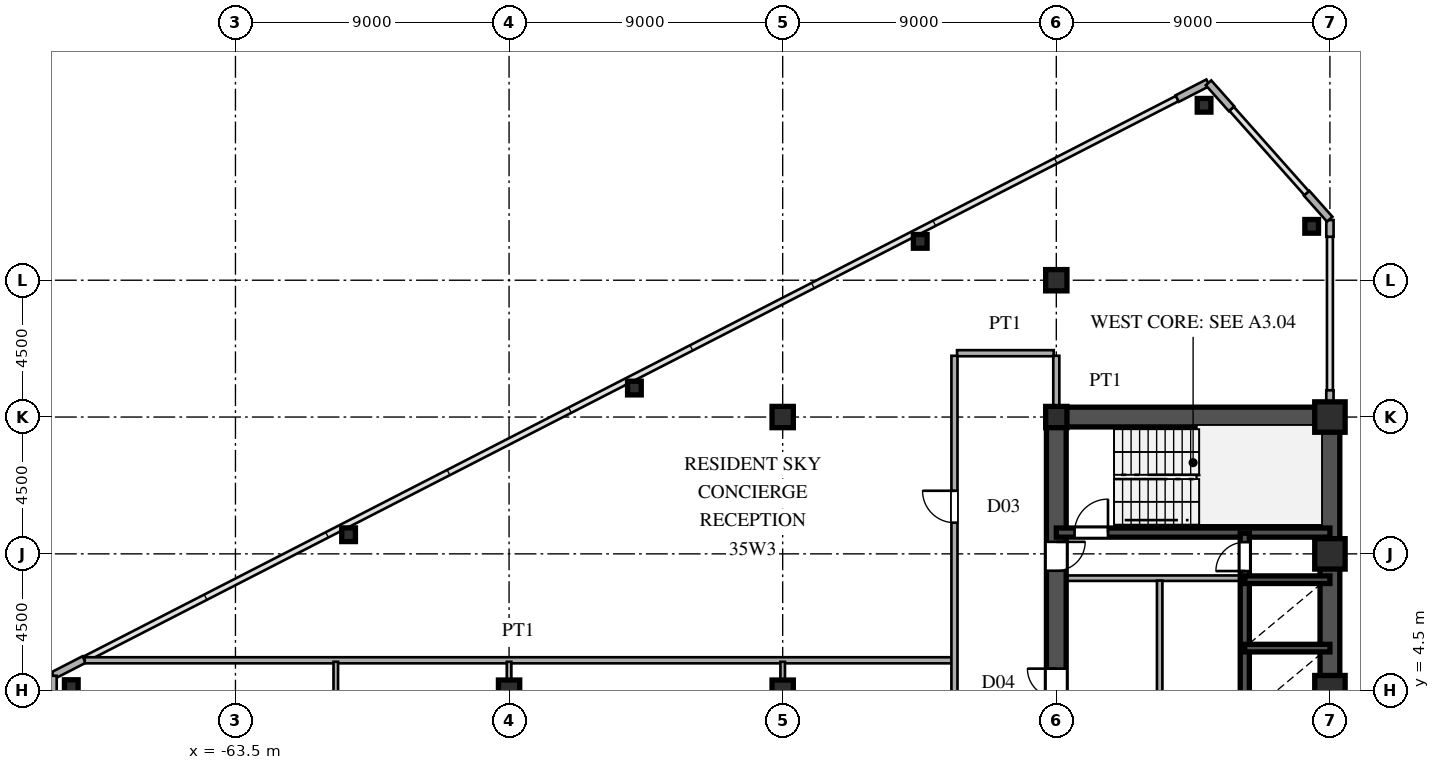
"""IFC4 building model, lengths in metres.
Left out: names, types, materials, properties, quantities, classifications, styles, units other than length and angle.
Written with IfcOpenShell. Run it as: python <this file> out.ifc"""

import sys

from ifc_helpers import new_model, si_unit, direction, frame, frame_2d, origin, origin_2d, place, context, subcontext, project, spatial, rectangle, hollow_rectangle, i_section, extrude, source, transform, mapped, element, fill, save


model = new_model("IFC4")
c1 = context("Model", 3, precision=1e-05, world=origin(), true_north=direction((0.0, 1.0)))
c2 = subcontext(c1, "Body", "Model", "MODEL_VIEW")
j1 = project(units=[si_unit("LENGTHUNIT", "METRE"), si_unit("PLANEANGLEUNIT", "RADIAN")], contexts=[c1])
p1 = place(None, origin())
s1 = spatial("IfcSite", under=j1, at=p1, CompositionType="ELEMENT")
p2 = place(p1, origin())
s2 = spatial("IfcBuilding", under=s1, at=p2, CompositionType="ELEMENT")
p3 = place(p2, frame((0.0, 0.0, 132.0)))
s3 = spatial("IfcBuildingStorey", under=s2, at=p3, CompositionType="ELEMENT", Elevation=132.0)
m1 = source(origin(), c2, "Body", "SweptSolid", [
    extrude(hollow_rectangle(XDim=1.0, YDim=1.0, WallThickness=0.042, at=origin_2d()), origin(), (0.0, 0.0, 1.0), 3.6),
])
for number, where, z_axis, x_axis in (
    (1, (-27.5, 4.5, 0.0), (0.0, 0.0, 1.0), (1.0, 0.0, 0.0)),
    (2, (-27.5, 9.0, 0.0), (0.0, 0.0, 1.0), (1.0, 0.0, 0.0)),
    (3, (-27.5, 13.5, 0.0), (0.0, 0.0, 1.0), (1.0, 0.0, 0.0)),
):
    element("IfcColumn", number, at=place(p3, frame(where, z_axis=z_axis, x_axis=x_axis)), inside=s3, PredefinedType="COLUMN", context=c2, shape_type="MappedRepresentation", body=[
        mapped(m1, transform((0.0, 0.0, 0.0), scale=1.0)),
    ])
m2 = source(origin(), c2, "Body", "SweptSolid", [
    extrude(i_section(OverallWidth=0.7, OverallDepth=0.7, WebThickness=0.028, FlangeThickness=0.045, at=origin_2d()), origin(), (0.0, 0.0, 1.0), 3.6),
])
for number, where, z_axis, x_axis in (
    (4, (-36.5, 13.5, 0.0), (0.0, 0.0, 1.0), (1.0, 0.0, 0.0)),
    (5, (-36.5, 18.0, 0.0), (0.0, 0.0, 1.0), (1.0, 0.0, 0.0)),
    (6, (-45.5, 4.5, 0.0), (0.0, 0.0, 1.0), (1.0, 0.0, 0.0)),
    (7, (-45.5, 13.5, 0.0), (0.0, 0.0, 1.0), (1.0, 0.0, 0.0)),
    (8, (-54.5, 4.5, 0.0), (0.0, 0.0, 1.0), (1.0, 0.0, 0.0)),
):
    element("IfcColumn", number, at=place(p3, frame(where, z_axis=z_axis, x_axis=x_axis)), inside=s3, PredefinedType="COLUMN", context=c2, shape_type="MappedRepresentation", body=[
        mapped(m2, transform((0.0, 0.0, 0.0), scale=1.0)),
    ])
m3 = source(origin(), c2, "Body", "SweptSolid", [
    extrude(hollow_rectangle(XDim=0.45, YDim=0.45, WallThickness=0.018, at=origin_2d()), origin(), (0.0, 0.0, 1.0), 3.6),
])
for number, where, z_axis, x_axis in (
    (9, (-28.1, 19.772, 0.0), (0.0, 0.0, 1.0), (1.0, 0.0, 0.0)),
    (10, (-31.64, 23.754, 0.0), (0.0, 0.0, 1.0), (1.0, 0.0, 0.0)),
    (11, (-68.9, 4.634, 0.0), (0.0, 0.0, 1.0), (1.0, 0.0, 0.0)),
    (12, (-40.976, 19.278, 0.0), (0.0, 0.0, 1.0), (1.0, 0.0, 0.0)),
    (13, (-50.377, 14.453, 0.0), (0.0, 0.0, 1.0), (1.0, 0.0, 0.0)),
    (14, (-59.779, 9.629, 0.0), (0.0, 0.0, 1.0), (1.0, 0.0, 0.0)),
):
    element("IfcColumn", number, at=place(p3, frame(where, z_axis=z_axis, x_axis=x_axis)), inside=s3, PredefinedType="COLUMN", context=c2, shape_type="MappedRepresentation", body=[
        mapped(m3, transform((0.0, 0.0, 0.0), scale=1.0)),
    ])
p4 = place(p3, frame((-27.5, 13.83, 0.0), z_axis=(0.0, 0.0, 1.0), x_axis=(0.0, 1.0, 0.0)))
e15 = element("IfcWall", 15, at=p4, inside=s3, PredefinedType="SOLIDWALL", context=c2, shape_type="SweptSolid", body=[
    extrude(rectangle(XDim=0.55, YDim=0.24, at=frame_2d((0.275, 0.0))), origin(), (0.0, 0.0, 1.0), 2.79),
])
p5 = place(p3, frame((-27.5, 19.43, 0.0), z_axis=(0.0, 0.0, 1.0), x_axis=(0.0, 1.0, 0.0)))
e16 = element("IfcWall", 16, at=p5, inside=s3, PredefinedType="SOLIDWALL", context=c2, shape_type="SweptSolid", body=[
    extrude(rectangle(XDim=0.55, YDim=0.24, at=frame_2d((0.275, 0.0))), origin(), (0.0, 0.0, 1.0), 3.34),
])
for number, where, z_axis, x_axis in (
    (17, (-27.507, 20.008, 0.0), (0.0, 0.0, 1.0), (-0.664, 0.747, 0.0)),
    (18, (-30.736, 23.64, 0.0), (0.0, 0.0, 1.0), (-0.664, 0.747, 0.0)),
):
    element("IfcWall", number, at=place(p3, frame(where, z_axis=z_axis, x_axis=x_axis)), inside=s3, PredefinedType="SOLIDWALL", context=c2, shape_type="SweptSolid", body=[
        extrude(rectangle(XDim=1.14, YDim=0.24, at=frame_2d((0.57, 0.0))), origin(), (0.0, 0.0, 1.0), 3.34),
    ])
for number, where, z_axis, x_axis in (
    (19, (-31.509, 24.495, 0.0), (0.0, 0.0, 1.0), (-0.89, -0.456, 0.0)),
    (20, (-68.477, 5.525, 0.0), (0.0, 0.0, 1.0), (-0.89, -0.456, 0.0)),
):
    element("IfcWall", number, at=place(p3, frame(where, z_axis=z_axis, x_axis=x_axis)), inside=s3, PredefinedType="SOLIDWALL", context=c2, shape_type="SweptSolid", body=[
        extrude(rectangle(XDim=1.14, YDim=0.24, at=frame_2d((0.57, 0.0))), origin(), (0.0, 0.0, 1.0), 3.34),
    ])
p6 = place(p3, frame((-69.5, 4.99, 0.0), z_axis=(0.0, 0.0, 1.0), x_axis=(0.0, -1.0, 0.0)))
e21 = element("IfcWall", 21, at=p6, inside=s3, PredefinedType="SOLIDWALL", context=c2, shape_type="SweptSolid", body=[
    extrude(rectangle(XDim=1.14, YDim=0.24, at=frame_2d((0.57, 0.0))), origin(), (0.0, 0.0, 1.0), 3.34),
])
p7 = place(p3, frame((-27.5, 1.3, 0.0), z_axis=(0.0, 0.0, 1.0), x_axis=(0.0, 1.0, 0.0)))
e22 = element("IfcWall", 22, at=p7, inside=s3, PredefinedType="SHEAR", context=c2, shape_type="SweptSolid", body=[
    extrude(rectangle(XDim=12.2, YDim=0.65, at=frame_2d((6.1, 0.0))), origin(), (0.0, 0.0, 1.0), 3.34),
])
p8 = place(p3, frame((-36.5, 13.5, 0.0), z_axis=(0.0, 0.0, 1.0), x_axis=(1.0, 0.0, 0.0)))
e23 = element("IfcWall", 23, at=p8, inside=s3, PredefinedType="SHEAR", context=c2, shape_type="SweptSolid", body=[
    extrude(rectangle(XDim=9.0, YDim=0.65, at=frame_2d((4.5, 0.0))), origin(), (0.0, 0.0, 1.0), 3.34),
])
p9 = place(p3, frame((-36.5, 8.2, 0.0), z_axis=(0.0, 0.0, 1.0), x_axis=(0.0, 1.0, 0.0)))
e24 = element("IfcWall", 24, at=p9, inside=s3, PredefinedType="SHEAR", context=c2, shape_type="SweptSolid", body=[
    extrude(rectangle(XDim=5.45, YDim=0.65, at=frame_2d((2.725, 0.0))), origin(), (0.0, 0.0, 1.0), 3.34),
])
p10 = place(p9, frame((0.245, 0.0, 0.0)))
e25 = element("IfcOpeningElement", 25, at=p10, cuts=e24, PredefinedType="OPENING", context=c2, shape_type="SweptSolid", body=[
    extrude(rectangle(XDim=0.95, YDim=2.15, at=frame_2d((0.475, 1.075))), frame((0.0, 0.335, 0.0), z_axis=(0.0, -1.0, 0.0), x_axis=(1.0, 0.0, 0.0)), (0.0, 0.0, 1.0), 0.67),
])
p11 = place(p3, frame((-36.5, 1.3, 0.0), z_axis=(0.0, 0.0, 1.0), x_axis=(0.0, 1.0, 0.0)))
e26 = element("IfcWall", 26, at=p11, inside=s3, PredefinedType="SHEAR", context=c2, shape_type="SweptSolid", body=[
    extrude(rectangle(XDim=6.9, YDim=0.65, at=frame_2d((3.45, 0.0))), origin(), (0.0, 0.0, 1.0), 3.34),
])
p12 = place(p11, frame((2.975, 0.0, 0.0)))
e27 = element("IfcOpeningElement", 27, at=p12, cuts=e26, PredefinedType="OPENING", context=c2, shape_type="SweptSolid", body=[
    extrude(rectangle(XDim=0.95, YDim=2.15, at=frame_2d((0.475, 1.075))), frame((0.0, 0.335, 0.0), z_axis=(0.0, -1.0, 0.0), x_axis=(1.0, 0.0, 0.0)), (0.0, 0.0, 1.0), 0.67),
])
p13 = place(p3, frame((-36.5, 9.7, 0.0), z_axis=(0.0, 0.0, 1.0), x_axis=(1.0, 0.0, 0.0)))
e28 = element("IfcWall", 28, at=p13, inside=s3, PredefinedType="SHEAR", context=c2, shape_type="SweptSolid", body=[
    extrude(rectangle(XDim=9.0, YDim=0.3, at=frame_2d((4.5, 0.0))), origin(), (0.0, 0.0, 1.0), 3.34),
])
p14 = place(p13, frame((0.6, 0.0, 0.0)))
e29 = element("IfcOpeningElement", 29, at=p14, cuts=e28, PredefinedType="OPENING", context=c2, shape_type="SweptSolid", body=[
    extrude(rectangle(XDim=1.1, YDim=2.2, at=frame_2d((0.55, 1.1))), frame((0.0, 0.16, 0.0), z_axis=(0.0, -1.0, 0.0), x_axis=(1.0, 0.0, 0.0)), (0.0, 0.0, 1.0), 0.32),
])
for number, where, z_axis, x_axis in (
    (30, (-30.3, 5.9, 0.0), (0.0, 0.0, 1.0), (1.0, 0.0, 0.0)),
    (31, (-30.3, 8.15, 0.0), (0.0, 0.0, 1.0), (1.0, 0.0, 0.0)),
):
    element("IfcWall", number, at=place(p3, frame(where, z_axis=z_axis, x_axis=x_axis)), inside=s3, PredefinedType="SHEAR", context=c2, shape_type="SweptSolid", body=[
        extrude(rectangle(XDim=2.8, YDim=0.25, at=frame_2d((1.4, 0.0))), origin(), (0.0, 0.0, 1.0), 3.34),
    ])
p15 = place(p3, frame((-30.3, 3.6, 0.0), z_axis=(0.0, 0.0, 1.0), x_axis=(0.0, 1.0, 0.0)))
e32 = element("IfcWall", 32, at=p15, inside=s3, PredefinedType="SHEAR", context=c2, shape_type="SweptSolid", body=[
    extrude(rectangle(XDim=2.3, YDim=0.3, at=frame_2d((1.15, 0.0))), origin(), (0.0, 0.0, 1.0), 3.34),
])
p16 = place(p3, frame((-30.3, 5.9, 0.0), z_axis=(0.0, 0.0, 1.0), x_axis=(0.0, 1.0, 0.0)))
e33 = element("IfcWall", 33, at=p16, inside=s3, PredefinedType="SHEAR", context=c2, shape_type="SweptSolid", body=[
    extrude(rectangle(XDim=2.25, YDim=0.3, at=frame_2d((1.125, 0.0))), origin(), (0.0, 0.0, 1.0), 3.34),
])
p17 = place(p3, frame((-30.3, 8.15, 0.0), z_axis=(0.0, 0.0, 1.0), x_axis=(0.0, 1.0, 0.0)))
e34 = element("IfcWall", 34, at=p17, inside=s3, PredefinedType="SHEAR", context=c2, shape_type="SweptSolid", body=[
    extrude(rectangle(XDim=1.53, YDim=0.3, at=frame_2d((0.765, 0.0))), origin(), (0.0, 0.0, 1.0), 3.34),
])
p18 = place(p17, frame((0.285, 0.0, 0.0)))
e35 = element("IfcOpeningElement", 35, at=p18, cuts=e34, PredefinedType="OPENING", context=c2, shape_type="SweptSolid", body=[
    extrude(rectangle(XDim=0.95, YDim=2.15, at=frame_2d((0.475, 1.075))), frame((0.0, 0.16, 0.0), z_axis=(0.0, -1.0, 0.0), x_axis=(1.0, 0.0, 0.0)), (0.0, 0.0, 1.0), 0.32),
])
p19 = place(p3, frame((-36.15, 8.2, 0.0), z_axis=(0.0, 0.0, 1.0), x_axis=(1.0, 0.0, 0.0)))
e36 = element("IfcWall", 36, at=p19, inside=s3, PredefinedType="PARTITIONING", context=c2, shape_type="SweptSolid", body=[
    extrude(rectangle(XDim=5.7, YDim=0.18, at=frame_2d((2.85, 0.0))), origin(), (0.0, 0.0, 1.0), 3.34),
])
p20 = place(p3, frame((-33.1, 1.38, 0.0), z_axis=(0.0, 0.0, 1.0), x_axis=(0.0, 1.0, 0.0)))
e37 = element("IfcWall", 37, at=p20, inside=s3, PredefinedType="PARTITIONING", context=c2, shape_type="SweptSolid", body=[
    extrude(rectangle(XDim=6.74, YDim=0.18, at=frame_2d((3.37, 0.0))), origin(), (0.0, 0.0, 1.0), 3.34),
])
p21 = place(p3, frame((-68.458, 5.5, 0.0), z_axis=(0.0, 0.0, 1.0), x_axis=(1.0, 0.0, 0.0)))
e38 = element("IfcWall", 38, at=p21, inside=s3, PredefinedType="PARTITIONING", context=c2, shape_type="SweptSolid", body=[
    extrude(rectangle(XDim=28.529, YDim=0.2, at=frame_2d((14.264, 0.0))), origin(), (0.0, 0.0, 1.0), 3.34),
])
p22 = place(p3, frame((-39.765, 15.6, 0.0), z_axis=(0.0, 0.0, 1.0), x_axis=(1.0, 0.0, 0.0)))
e39 = element("IfcWall", 39, at=p22, inside=s3, PredefinedType="PARTITIONING", context=c2, shape_type="SweptSolid", body=[
    extrude(rectangle(XDim=3.18, YDim=0.2, at=frame_2d((1.59, 0.0))), origin(), (0.0, 0.0, 1.0), 3.34),
])
p23 = place(p3, frame((-60.2, -8.45, 0.0), z_axis=(0.0, 0.0, 1.0), x_axis=(0.0, 1.0, 0.0)))
e40 = element("IfcWall", 40, at=p23, inside=s3, PredefinedType="PARTITIONING", context=c2, shape_type="SweptSolid", body=[
    extrude(rectangle(XDim=13.9, YDim=0.15, at=frame_2d((6.95, 0.0))), origin(), (0.0, 0.0, 1.0), 3.34),
])
p24 = place(p23, frame((1.808, 0.0, 0.0)))
e41 = element("IfcOpeningElement", 41, at=p24, cuts=e40, PredefinedType="OPENING", context=c2, shape_type="SweptSolid", body=[
    extrude(rectangle(XDim=0.95, YDim=2.15, at=frame_2d((0.475, 1.075))), frame((0.0, 0.085, 0.0), z_axis=(0.0, -1.0, 0.0), x_axis=(1.0, 0.0, 0.0)), (0.0, 0.0, 1.0), 0.17),
])
p25 = place(p23, frame((6.475, 0.0, 0.0)))
e42 = element("IfcOpeningElement", 42, at=p25, cuts=e40, PredefinedType="OPENING", context=c2, shape_type="SweptSolid", body=[
    extrude(rectangle(XDim=0.95, YDim=2.15, at=frame_2d((0.475, 1.075))), frame((0.0, 0.085, 0.0), z_axis=(0.0, -1.0, 0.0), x_axis=(1.0, 0.0, 0.0)), (0.0, 0.0, 1.0), 0.17),
])
p26 = place(p23, frame((11.142, 0.0, 0.0)))
e43 = element("IfcOpeningElement", 43, at=p26, cuts=e40, PredefinedType="OPENING", context=c2, shape_type="SweptSolid", body=[
    extrude(rectangle(XDim=0.95, YDim=2.15, at=frame_2d((0.475, 1.075))), frame((0.0, 0.085, 0.0), z_axis=(0.0, -1.0, 0.0), x_axis=(1.0, 0.0, 0.0)), (0.0, 0.0, 1.0), 0.17),
])
p27 = place(p3, frame((-54.5, -4.52, 0.0), z_axis=(0.0, 0.0, 1.0), x_axis=(0.0, 1.0, 0.0)))
e44 = element("IfcWall", 44, at=p27, inside=s3, PredefinedType="PARTITIONING", context=c2, shape_type="SweptSolid", body=[
    extrude(rectangle(XDim=9.04, YDim=0.15, at=frame_2d((4.52, 0.0))), origin(), (0.0, 0.0, 1.0), 2.44),
])
p28 = place(p27, frame((2.545, 0.0, 0.0)))
e45 = element("IfcOpeningElement", 45, at=p28, cuts=e44, PredefinedType="OPENING", context=c2, shape_type="SweptSolid", body=[
    extrude(rectangle(XDim=0.95, YDim=2.15, at=frame_2d((0.475, 1.075))), frame((0.0, 0.085, 0.0), z_axis=(0.0, -1.0, 0.0), x_axis=(1.0, 0.0, 0.0)), (0.0, 0.0, 1.0), 0.17),
])
p29 = place(p3, frame((-54.5, 4.52, 0.0), z_axis=(0.0, 0.0, 1.0), x_axis=(0.0, 1.0, 0.0)))
e46 = element("IfcWall", 46, at=p29, inside=s3, PredefinedType="PARTITIONING", context=c2, shape_type="SweptSolid", body=[
    extrude(rectangle(XDim=0.93, YDim=0.15, at=frame_2d((0.465, 0.0))), origin(), (0.0, 0.0, 1.0), 3.34),
])
p30 = place(p3, frame((-45.5, 1.352, 0.0), z_axis=(0.0, 0.0, 1.0), x_axis=(0.0, 1.0, 0.0)))
e47 = element("IfcWall", 47, at=p30, inside=s3, PredefinedType="PARTITIONING", context=c2, shape_type="SweptSolid", body=[
    extrude(rectangle(XDim=4.098, YDim=0.15, at=frame_2d((2.049, 0.0))), origin(), (0.0, 0.0, 1.0), 2.44),
])
p31 = place(p3, frame((-39.85, -15.515, 0.0), z_axis=(0.0, 0.0, 1.0), x_axis=(0.0, 1.0, 0.0)))
e48 = element("IfcWall", 48, at=p31, inside=s3, PredefinedType="PARTITIONING", context=c2, shape_type="SweptSolid", body=[
    extrude(rectangle(XDim=31.03, YDim=0.2, at=frame_2d((15.515, 0.0))), origin(), (0.0, 0.0, 1.0), 3.34),
])
p32 = place(p31, frame((2.94, 0.0, 0.0)))
e49 = element("IfcOpeningElement", 49, at=p32, cuts=e48, PredefinedType="OPENING", context=c2, shape_type="SweptSolid", body=[
    extrude(rectangle(XDim=1.05, YDim=2.25, at=frame_2d((0.525, 1.125))), frame((0.0, 0.11, 0.0), z_axis=(0.0, -1.0, 0.0), x_axis=(1.0, 0.0, 0.0)), (0.0, 0.0, 1.0), 0.22),
])
p33 = place(p31, frame((13.28, 0.0, 0.0)))
e50 = element("IfcOpeningElement", 50, at=p33, cuts=e48, PredefinedType="OPENING", context=c2, shape_type="SweptSolid", body=[
    extrude(rectangle(XDim=1.05, YDim=2.25, at=frame_2d((0.525, 1.125))), frame((0.0, 0.11, 0.0), z_axis=(0.0, -1.0, 0.0), x_axis=(1.0, 0.0, 0.0)), (0.0, 0.0, 1.0), 0.22),
])
p34 = place(p31, frame((25.54, 0.0, 0.0)))
e51 = element("IfcOpeningElement", 51, at=p34, cuts=e48, PredefinedType="OPENING", context=c2, shape_type="SweptSolid", body=[
    extrude(rectangle(XDim=1.05, YDim=2.25, at=frame_2d((0.525, 1.125))), frame((0.0, 0.11, 0.0), z_axis=(0.0, -1.0, 0.0), x_axis=(1.0, 0.0, 0.0)), (0.0, 0.0, 1.0), 0.22),
])
p35 = place(p3, frame((-36.5, 13.83, 0.0), z_axis=(0.0, 0.0, 1.0), x_axis=(0.0, 1.0, 0.0)))
e52 = element("IfcWall", 52, at=p35, inside=s3, PredefinedType="PARTITIONING", context=c2, shape_type="SweptSolid", body=[
    extrude(rectangle(XDim=1.685, YDim=0.2, at=frame_2d((0.842, 0.0))), origin(), (0.0, 0.0, 1.0), 2.44),
])
m4 = source(origin(), c2, "Body", "SweptSolid", [
    extrude(rectangle(XDim=0.95, YDim=2.15, at=frame_2d((0.475, 1.075))), frame((0.0, 0.025, 0.0), z_axis=(0.0, -1.0, 0.0), x_axis=(1.0, 0.0, 0.0)), (0.0, 0.0, 1.0), 0.05),
])
p36 = place(p10, frame((0.95, 0.0, 0.0), z_axis=(0.0, 0.0, 1.0), x_axis=(-1.0, 0.0, 0.0)))
e53 = element("IfcDoor", 53, at=p36, inside=s3, OperationType="SINGLE_SWING_RIGHT", PredefinedType="DOOR", context=c2, shape_type="MappedRepresentation", body=[
    mapped(m4, transform((0.0, 0.0, 0.0), scale=1.0)),
])
fill(e25, e53)
p37 = place(p12, origin())
e54 = element("IfcDoor", 54, at=p37, inside=s3, OperationType="SINGLE_SWING_RIGHT", PredefinedType="DOOR", context=c2, shape_type="MappedRepresentation", body=[
    mapped(m4, transform((0.0, 0.0, 0.0), scale=1.0)),
])
fill(e27, e54)
m5 = source(origin(), c2, "Body", "SweptSolid", [
    extrude(rectangle(XDim=1.1, YDim=2.2, at=frame_2d((0.55, 1.1))), frame((0.0, 0.025, 0.0), z_axis=(0.0, -1.0, 0.0), x_axis=(1.0, 0.0, 0.0)), (0.0, 0.0, 1.0), 0.05),
])
p38 = place(p14, origin())
e55 = element("IfcDoor", 55, at=p38, inside=s3, OperationType="SINGLE_SWING_RIGHT", PredefinedType="DOOR", context=c2, shape_type="MappedRepresentation", body=[
    mapped(m5, transform((0.0, 0.0, 0.0), scale=1.0)),
])
fill(e29, e55)
p39 = place(p18, origin())
e56 = element("IfcDoor", 56, at=p39, inside=s3, OperationType="SINGLE_SWING_LEFT", PredefinedType="DOOR", context=c2, shape_type="MappedRepresentation", body=[
    mapped(m4, transform((0.0, 0.0, 0.0), scale=1.0)),
])
fill(e35, e56)
m6 = source(origin(), c2, "Body", "SweptSolid", [
    extrude(rectangle(XDim=1.05, YDim=2.25, at=frame_2d((0.525, 1.125))), frame((0.0, 0.025, 0.0), z_axis=(0.0, -1.0, 0.0), x_axis=(1.0, 0.0, 0.0)), (0.0, 0.0, 1.0), 0.05),
])
p40 = place(p34, origin())
e57 = element("IfcDoor", 57, at=p40, inside=s3, OperationType="SINGLE_SWING_RIGHT", PredefinedType="DOOR", context=c2, shape_type="MappedRepresentation", body=[
    mapped(m6, transform((0.0, 0.0, 0.0), scale=1.0)),
])
fill(e51, e57)
save(model, sys.argv[1])
